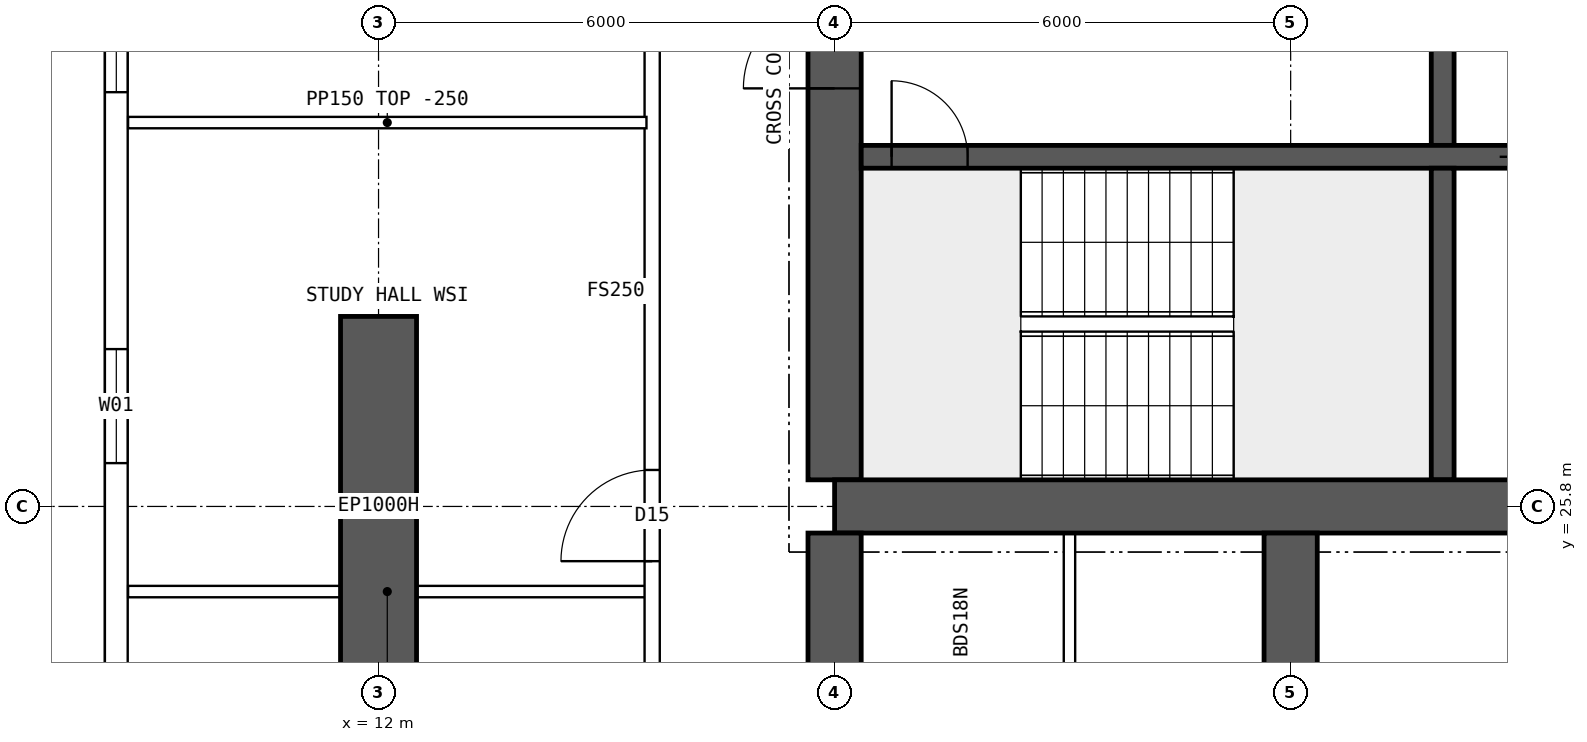
"""IFC4 building model, lengths in metres.
Left out: names, types, materials, properties, quantities, classifications, styles, units other than length and angle.
Written with IfcOpenShell. Run it as: python <this file> out.ifc"""

import sys

from ifc_helpers import new_model, si_unit, direction, frame, frame_2d, origin, place, context, subcontext, project, spatial, polyline, rectangle, outline, extrude, element, fill, save


model = new_model("IFC4")
c1 = context("Model", 3, precision=1e-05, world=origin(), true_north=direction((0.0, 1.0)))
c2 = subcontext(c1, "Body", "Model", "MODEL_VIEW")
j1 = project(units=[si_unit("LENGTHUNIT", "METRE"), si_unit("PLANEANGLEUNIT", "RADIAN")], contexts=[c1])
p1 = place(None, origin())
s1 = spatial("IfcSite", under=j1, at=p1, CompositionType="ELEMENT")
p2 = place(p1, origin())
s2 = spatial("IfcBuilding", under=s1, at=p2, CompositionType="ELEMENT")
p3 = place(p2, frame((0.0, 0.0, 220.3)))
s3 = spatial("IfcBuildingStorey", under=s2, at=p3, CompositionType="ELEMENT", Elevation=220.3)
p4 = place(p3, frame((12.0, 23.3, 0.0), z_axis=(0.0, 0.0, 1.0), x_axis=(0.0, 1.0, 0.0)))
e1 = element("IfcWall", 1, at=p4, inside=s3, PredefinedType="SHEAR", context=c2, shape_type="SweptSolid", body=[
    extrude(rectangle(XDim=5.0, YDim=1.0, at=frame_2d((2.5, 0.0))), origin(), (0.0, 0.0, 1.0), 3.75),
])
p5 = place(p3, frame((18.0, 25.8, 0.0), z_axis=(0.0, 0.0, 1.0), x_axis=(1.0, 0.0, 0.0)))
e2 = element("IfcWall", 2, at=p5, inside=s3, PredefinedType="SHEAR", context=c2, shape_type="SweptSolid", body=[
    extrude(rectangle(XDim=48.0, YDim=0.7, at=frame_2d((24.0, 0.0))), origin(), (0.0, 0.0, 1.0), 3.75),
])
p6 = place(p3, frame((18.0, 26.15, 0.0), z_axis=(0.0, 0.0, 1.0), x_axis=(0.0, 1.0, 0.0)))
e3 = element("IfcWall", 3, at=p6, inside=s3, PredefinedType="SHEAR", context=c2, shape_type="SweptSolid", body=[
    extrude(rectangle(XDim=11.7, YDim=0.7, at=frame_2d((5.85, 0.0))), origin(), (0.0, 0.0, 1.0), 3.75),
])
p7 = place(p6, frame((5.15, 0.0, 0.0)))
e4 = element("IfcOpeningElement", 4, at=p7, cuts=e3, PredefinedType="OPENING", context=c2, shape_type="SweptSolid", body=[
    extrude(rectangle(XDim=1.2, YDim=2.1, at=frame_2d((0.6, 1.05))), frame((0.0, 0.36, 0.0), z_axis=(0.0, -1.0, 0.0), x_axis=(1.0, 0.0, 0.0)), (0.0, 0.0, 1.0), 0.72),
])
p8 = place(p3, frame((18.35, 30.4, 0.0), z_axis=(0.0, 0.0, 1.0), x_axis=(1.0, 0.0, 0.0)))
e5 = element("IfcWall", 5, at=p8, inside=s3, PredefinedType="SHEAR", context=c2, shape_type="SweptSolid", body=[
    extrude(rectangle(XDim=47.3, YDim=0.3, at=frame_2d((23.65, 0.0))), origin(), (0.0, 0.0, 1.0), 3.75),
])
p9 = place(p8, frame((0.4, 0.0, 0.0)))
e6 = element("IfcOpeningElement", 6, at=p9, cuts=e5, PredefinedType="OPENING", context=c2, shape_type="SweptSolid", body=[
    extrude(rectangle(XDim=1.0, YDim=2.1, at=frame_2d((0.5, 1.05))), frame((0.0, 0.16, 0.0), z_axis=(0.0, -1.0, 0.0), x_axis=(1.0, 0.0, 0.0)), (0.0, 0.0, 1.0), 0.32),
])
p10 = place(p8, frame((45.9, 0.0, 0.0)))
e7 = element("IfcOpeningElement", 7, at=p10, cuts=e5, PredefinedType="OPENING", context=c2, shape_type="SweptSolid", body=[
    extrude(rectangle(XDim=1.0, YDim=2.1, at=frame_2d((0.5, 1.05))), frame((0.0, 0.16, 0.0), z_axis=(0.0, -1.0, 0.0), x_axis=(1.0, 0.0, 0.0)), (0.0, 0.0, 1.0), 0.32),
])
p11 = place(p8, frame((8.4, 0.0, 0.0)))
e8 = element("IfcOpeningElement", 8, at=p11, cuts=e5, PredefinedType="OPENING", context=c2, shape_type="SweptSolid", body=[
    extrude(rectangle(XDim=1.1, YDim=2.1, at=frame_2d((0.55, 1.05))), frame((0.0, 0.16, 0.0), z_axis=(0.0, -1.0, 0.0), x_axis=(1.0, 0.0, 0.0)), (0.0, 0.0, 1.0), 0.32),
])
p12 = place(p8, frame((11.0, 0.0, 0.0)))
e9 = element("IfcOpeningElement", 9, at=p12, cuts=e5, PredefinedType="OPENING", context=c2, shape_type="SweptSolid", body=[
    extrude(rectangle(XDim=1.1, YDim=2.1, at=frame_2d((0.55, 1.05))), frame((0.0, 0.16, 0.0), z_axis=(0.0, -1.0, 0.0), x_axis=(1.0, 0.0, 0.0)), (0.0, 0.0, 1.0), 0.32),
])
p13 = place(p8, frame((13.6, 0.0, 0.0)))
e10 = element("IfcOpeningElement", 10, at=p13, cuts=e5, PredefinedType="OPENING", context=c2, shape_type="SweptSolid", body=[
    extrude(rectangle(XDim=1.1, YDim=2.1, at=frame_2d((0.55, 1.05))), frame((0.0, 0.16, 0.0), z_axis=(0.0, -1.0, 0.0), x_axis=(1.0, 0.0, 0.0)), (0.0, 0.0, 1.0), 0.32),
])
p14 = place(p8, frame((16.2, 0.0, 0.0)))
e11 = element("IfcOpeningElement", 11, at=p14, cuts=e5, PredefinedType="OPENING", context=c2, shape_type="SweptSolid", body=[
    extrude(rectangle(XDim=1.1, YDim=2.1, at=frame_2d((0.55, 1.05))), frame((0.0, 0.16, 0.0), z_axis=(0.0, -1.0, 0.0), x_axis=(1.0, 0.0, 0.0)), (0.0, 0.0, 1.0), 0.32),
])
p15 = place(p8, frame((18.975, 0.0, 0.0)))
e12 = element("IfcOpeningElement", 12, at=p15, cuts=e5, PredefinedType="OPENING", context=c2, shape_type="SweptSolid", body=[
    extrude(rectangle(XDim=0.9, YDim=2.1, at=frame_2d((0.45, 1.05))), frame((0.0, 0.16, 0.0), z_axis=(0.0, -1.0, 0.0), x_axis=(1.0, 0.0, 0.0)), (0.0, 0.0, 1.0), 0.32),
])
p16 = place(p8, frame((24.475, 0.0, 0.0)))
e13 = element("IfcOpeningElement", 13, at=p16, cuts=e5, PredefinedType="OPENING", context=c2, shape_type="SweptSolid", body=[
    extrude(rectangle(XDim=0.9, YDim=2.1, at=frame_2d((0.45, 1.05))), frame((0.0, 0.16, 0.0), z_axis=(0.0, -1.0, 0.0), x_axis=(1.0, 0.0, 0.0)), (0.0, 0.0, 1.0), 0.32),
])
p17 = place(p8, frame((30.267, 0.0, 0.0)))
e14 = element("IfcOpeningElement", 14, at=p17, cuts=e5, PredefinedType="OPENING", context=c2, shape_type="SweptSolid", body=[
    extrude(rectangle(XDim=1.1, YDim=2.1, at=frame_2d((0.55, 1.05))), frame((0.0, 0.16, 0.0), z_axis=(0.0, -1.0, 0.0), x_axis=(1.0, 0.0, 0.0)), (0.0, 0.0, 1.0), 0.32),
])
p18 = place(p8, frame((33.8, 0.0, 0.0)))
e15 = element("IfcOpeningElement", 15, at=p18, cuts=e5, PredefinedType="OPENING", context=c2, shape_type="SweptSolid", body=[
    extrude(rectangle(XDim=1.1, YDim=2.1, at=frame_2d((0.55, 1.05))), frame((0.0, 0.16, 0.0), z_axis=(0.0, -1.0, 0.0), x_axis=(1.0, 0.0, 0.0)), (0.0, 0.0, 1.0), 0.32),
])
p19 = place(p8, frame((37.333, 0.0, 0.0)))
e16 = element("IfcOpeningElement", 16, at=p19, cuts=e5, PredefinedType="OPENING", context=c2, shape_type="SweptSolid", body=[
    extrude(rectangle(XDim=1.1, YDim=2.1, at=frame_2d((0.55, 1.05))), frame((0.0, 0.16, 0.0), z_axis=(0.0, -1.0, 0.0), x_axis=(1.0, 0.0, 0.0)), (0.0, 0.0, 1.0), 0.32),
])
p20 = place(p3, frame((26.0, 26.15, 0.0), z_axis=(0.0, 0.0, 1.0), x_axis=(0.0, 1.0, 0.0)))
e17 = element("IfcWall", 17, at=p20, inside=s3, PredefinedType="SHEAR", context=c2, shape_type="SweptSolid", body=[
    extrude(rectangle(XDim=4.1, YDim=0.3, at=frame_2d((2.05, 0.0))), origin(), (0.0, 0.0, 1.0), 3.75),
])
p21 = place(p3, frame((26.0, 30.55, 0.0), z_axis=(0.0, 0.0, 1.0), x_axis=(0.0, 1.0, 0.0)))
e18 = element("IfcWall", 18, at=p21, inside=s3, PredefinedType="SHEAR", context=c2, shape_type="SweptSolid", body=[
    extrude(rectangle(XDim=3.9, YDim=0.3, at=frame_2d((1.95, 0.0))), origin(), (0.0, 0.0, 1.0), 3.75),
])
p22 = place(p21, frame((1.4, 0.0, 0.0)))
e19 = element("IfcOpeningElement", 19, at=p22, cuts=e18, PredefinedType="OPENING", context=c2, shape_type="SweptSolid", body=[
    extrude(rectangle(XDim=1.2, YDim=2.1, at=frame_2d((0.6, 1.05))), frame((0.0, 0.16, 0.0), z_axis=(0.0, -1.0, 0.0), x_axis=(1.0, 0.0, 0.0)), (0.0, 0.0, 1.0), 0.32),
])
for number, where, z_axis, x_axis in (
    (20, (18.0, 18.4, 0.0), (0.0, 0.0, 1.0), (0.0, 1.0, 0.0)),
    (21, (24.0, 18.4, 0.0), (0.0, 0.0, 1.0), (0.0, 1.0, 0.0)),
):
    element("IfcWall", number, at=place(p3, frame(where, z_axis=z_axis, x_axis=x_axis)), inside=s3, PredefinedType="SHEAR", context=c2, shape_type="SweptSolid", body=[
        extrude(rectangle(XDim=7.05, YDim=0.7, at=frame_2d((3.525, 0.0))), origin(), (0.0, 0.0, 1.0), 3.75),
    ])
p23 = place(p3, frame((8.55, 44.2, 0.0), z_axis=(0.0, 0.0, 1.0), x_axis=(0.0, -1.0, 0.0)))
e22 = element("IfcWall", 22, at=p23, inside=s3, PredefinedType="SOLIDWALL", context=c2, shape_type="SweptSolid", body=[
    extrude(outline(polyline([(-0.015, -0.15), (24.415, -0.15), (24.385, 0.15), (0.015, 0.15), (-0.015, -0.15)])), origin(), (0.0, 0.0, 1.0), 3.5),
])
p24 = place(p23, frame((1.69, 0.0, 0.9)))
e23 = element("IfcOpeningElement", 23, at=p24, cuts=e22, PredefinedType="OPENING", context=c2, shape_type="SweptSolid", body=[
    extrude(rectangle(XDim=1.5, YDim=2.0, at=frame_2d((0.75, 1.0))), frame((0.0, 0.16, 0.0), z_axis=(0.0, -1.0, 0.0), x_axis=(1.0, 0.0, 0.0)), (0.0, 0.0, 1.0), 0.32),
])
p25 = place(p23, frame((6.57, 0.0, 0.9)))
e24 = element("IfcOpeningElement", 24, at=p25, cuts=e22, PredefinedType="OPENING", context=c2, shape_type="SweptSolid", body=[
    extrude(rectangle(XDim=1.5, YDim=2.0, at=frame_2d((0.75, 1.0))), frame((0.0, 0.16, 0.0), z_axis=(0.0, -1.0, 0.0), x_axis=(1.0, 0.0, 0.0)), (0.0, 0.0, 1.0), 0.32),
])
p26 = place(p23, frame((11.45, 0.0, 0.9)))
e25 = element("IfcOpeningElement", 25, at=p26, cuts=e22, PredefinedType="OPENING", context=c2, shape_type="SweptSolid", body=[
    extrude(rectangle(XDim=1.5, YDim=2.0, at=frame_2d((0.75, 1.0))), frame((0.0, 0.16, 0.0), z_axis=(0.0, -1.0, 0.0), x_axis=(1.0, 0.0, 0.0)), (0.0, 0.0, 1.0), 0.32),
])
p27 = place(p23, frame((16.33, 0.0, 0.9)))
e26 = element("IfcOpeningElement", 26, at=p27, cuts=e22, PredefinedType="OPENING", context=c2, shape_type="SweptSolid", body=[
    extrude(rectangle(XDim=1.5, YDim=2.0, at=frame_2d((0.75, 1.0))), frame((0.0, 0.16, 0.0), z_axis=(0.0, -1.0, 0.0), x_axis=(1.0, 0.0, 0.0)), (0.0, 0.0, 1.0), 0.32),
])
p28 = place(p23, frame((21.21, 0.0, 0.9)))
e27 = element("IfcOpeningElement", 27, at=p28, cuts=e22, PredefinedType="OPENING", context=c2, shape_type="SweptSolid", body=[
    extrude(rectangle(XDim=1.5, YDim=2.0, at=frame_2d((0.75, 1.0))), frame((0.0, 0.16, 0.0), z_axis=(0.0, -1.0, 0.0), x_axis=(1.0, 0.0, 0.0)), (0.0, 0.0, 1.0), 0.32),
])
p29 = place(p3, frame((21.09, 18.5, 0.0), z_axis=(0.0, 0.0, 1.0), x_axis=(0.0, 1.0, 0.0)))
e28 = element("IfcWall", 28, at=p29, inside=s3, PredefinedType="PARTITIONING", context=c2, shape_type="SweptSolid", body=[
    extrude(rectangle(XDim=6.95, YDim=0.15, at=frame_2d((3.475, 0.0))), origin(), (0.0, 0.0, 1.0), 3.5),
])
p30 = place(p3, frame((8.705, 30.85, 0.0), z_axis=(0.0, 0.0, 1.0), x_axis=(1.0, 0.0, 0.0)))
e29 = element("IfcWall", 29, at=p30, inside=s3, PredefinedType="PARTITIONING", context=c2, shape_type="SweptSolid", body=[
    extrude(outline(polyline([(0.0, 0.0), (6.82, 0.0), (6.82, 3.5), (3.597, 3.5), (3.595, 3.05), (2.997, 3.05), (2.995, 3.5), (0.0, 3.5), (0.0, 0.0)])), frame((0.0, 0.075, 0.0), z_axis=(0.0, -1.0, 0.0), x_axis=(1.0, 0.0, 0.0)), (0.0, 0.0, 1.0), 0.15),
])
p31 = place(p3, frame((15.6, 11.646, 0.0), z_axis=(0.0, 0.0, 1.0), x_axis=(0.0, 1.0, 0.0)))
e30 = element("IfcWall", 30, at=p31, inside=s3, PredefinedType="SOLIDWALL", context=c2, shape_type="SweptSolid", body=[
    extrude(rectangle(XDim=40.708, YDim=0.2, at=frame_2d((20.354, 0.0))), origin(), (0.0, 0.0, 1.0), 3.5),
])
p32 = place(p31, frame((13.434, 0.0, 0.0)))
e31 = element("IfcOpeningElement", 31, at=p32, cuts=e30, PredefinedType="OPENING", context=c2, shape_type="SweptSolid", body=[
    extrude(rectangle(XDim=1.2, YDim=2.1, at=frame_2d((0.6, 1.05))), frame((0.0, 0.11, 0.0), z_axis=(0.0, -1.0, 0.0), x_axis=(1.0, 0.0, 0.0)), (0.0, 0.0, 1.0), 0.22),
])
p33 = place(p31, frame((5.104, 0.0, 0.0)))
e32 = element("IfcOpeningElement", 32, at=p33, cuts=e30, PredefinedType="OPENING", context=c2, shape_type="SweptSolid", body=[
    extrude(rectangle(XDim=1.4, YDim=2.1, at=frame_2d((0.7, 1.05))), frame((0.0, 0.11, 0.0), z_axis=(0.0, -1.0, 0.0), x_axis=(1.0, 0.0, 0.0)), (0.0, 0.0, 1.0), 0.22),
])
p34 = place(p31, frame((34.104, 0.0, 0.0)))
e33 = element("IfcOpeningElement", 33, at=p34, cuts=e30, PredefinedType="OPENING", context=c2, shape_type="SweptSolid", body=[
    extrude(rectangle(XDim=1.4, YDim=2.1, at=frame_2d((0.7, 1.05))), frame((0.0, 0.11, 0.0), z_axis=(0.0, -1.0, 0.0), x_axis=(1.0, 0.0, 0.0)), (0.0, 0.0, 1.0), 0.22),
])
p35 = place(p3, frame((8.705, 24.68, 0.0), z_axis=(0.0, 0.0, 1.0), x_axis=(1.0, 0.0, 0.0)))
e34 = element("IfcWall", 34, at=p35, inside=s3, PredefinedType="PARTITIONING", context=c2, shape_type="SweptSolid", body=[
    extrude(rectangle(XDim=6.82, YDim=0.15, at=frame_2d((3.41, 0.0))), origin(), (0.0, 0.0, 1.0), 3.5),
])
p36 = place(p26, origin())
e35 = element("IfcWindow", 35, at=p36, inside=s3, PartitioningType="SINGLE_PANEL", PredefinedType="WINDOW", context=c2, shape_type="SweptSolid", body=[
    extrude(rectangle(XDim=1.5, YDim=2.0, at=frame_2d((0.75, 1.0))), frame((0.0, 0.03, 0.0), z_axis=(0.0, -1.0, 0.0), x_axis=(1.0, 0.0, 0.0)), (0.0, 0.0, 1.0), 0.06),
])
fill(e25, e35)
p37 = place(p27, origin())
e36 = element("IfcWindow", 36, at=p37, inside=s3, PartitioningType="SINGLE_PANEL", PredefinedType="WINDOW", context=c2, shape_type="SweptSolid", body=[
    extrude(rectangle(XDim=1.5, YDim=2.0, at=frame_2d((0.75, 1.0))), frame((0.0, 0.03, 0.0), z_axis=(0.0, -1.0, 0.0), x_axis=(1.0, 0.0, 0.0)), (0.0, 0.0, 1.0), 0.06),
])
fill(e26, e36)
p38 = place(p7, origin())
e37 = element("IfcDoor", 37, at=p38, inside=s3, OperationType="SINGLE_SWING_LEFT", PredefinedType="DOOR", context=c2, shape_type="SweptSolid", body=[
    extrude(rectangle(XDim=1.2, YDim=2.1, at=frame_2d((0.6, 1.05))), frame((0.0, 0.025, 0.0), z_axis=(0.0, -1.0, 0.0), x_axis=(1.0, 0.0, 0.0)), (0.0, 0.0, 1.0), 0.05),
])
fill(e4, e37)
p39 = place(p9, origin())
e38 = element("IfcDoor", 38, at=p39, inside=s3, OperationType="SINGLE_SWING_LEFT", PredefinedType="DOOR", context=c2, shape_type="SweptSolid", body=[
    extrude(rectangle(XDim=1.0, YDim=2.1, at=frame_2d((0.5, 1.05))), frame((0.0, 0.025, 0.0), z_axis=(0.0, -1.0, 0.0), x_axis=(1.0, 0.0, 0.0)), (0.0, 0.0, 1.0), 0.05),
])
fill(e6, e38)
p40 = place(p11, origin())
e39 = element("IfcDoor", 39, at=p40, inside=s3, OperationType="DOUBLE_DOOR_SLIDING", PredefinedType="DOOR", context=c2, shape_type="SweptSolid", body=[
    extrude(rectangle(XDim=1.1, YDim=2.1, at=frame_2d((0.55, 1.05))), frame((0.0, 0.025, 0.0), z_axis=(0.0, -1.0, 0.0), x_axis=(1.0, 0.0, 0.0)), (0.0, 0.0, 1.0), 0.05),
])
fill(e8, e39)
p41 = place(p32, origin())
e40 = element("IfcDoor", 40, at=p41, inside=s3, OperationType="SINGLE_SWING_LEFT", PredefinedType="DOOR", context=c2, shape_type="SweptSolid", body=[
    extrude(rectangle(XDim=1.2, YDim=2.1, at=frame_2d((0.6, 1.05))), frame((0.0, 0.025, 0.0), z_axis=(0.0, -1.0, 0.0), x_axis=(1.0, 0.0, 0.0)), (0.0, 0.0, 1.0), 0.05),
])
fill(e31, e40)
save(model, sys.argv[1])
